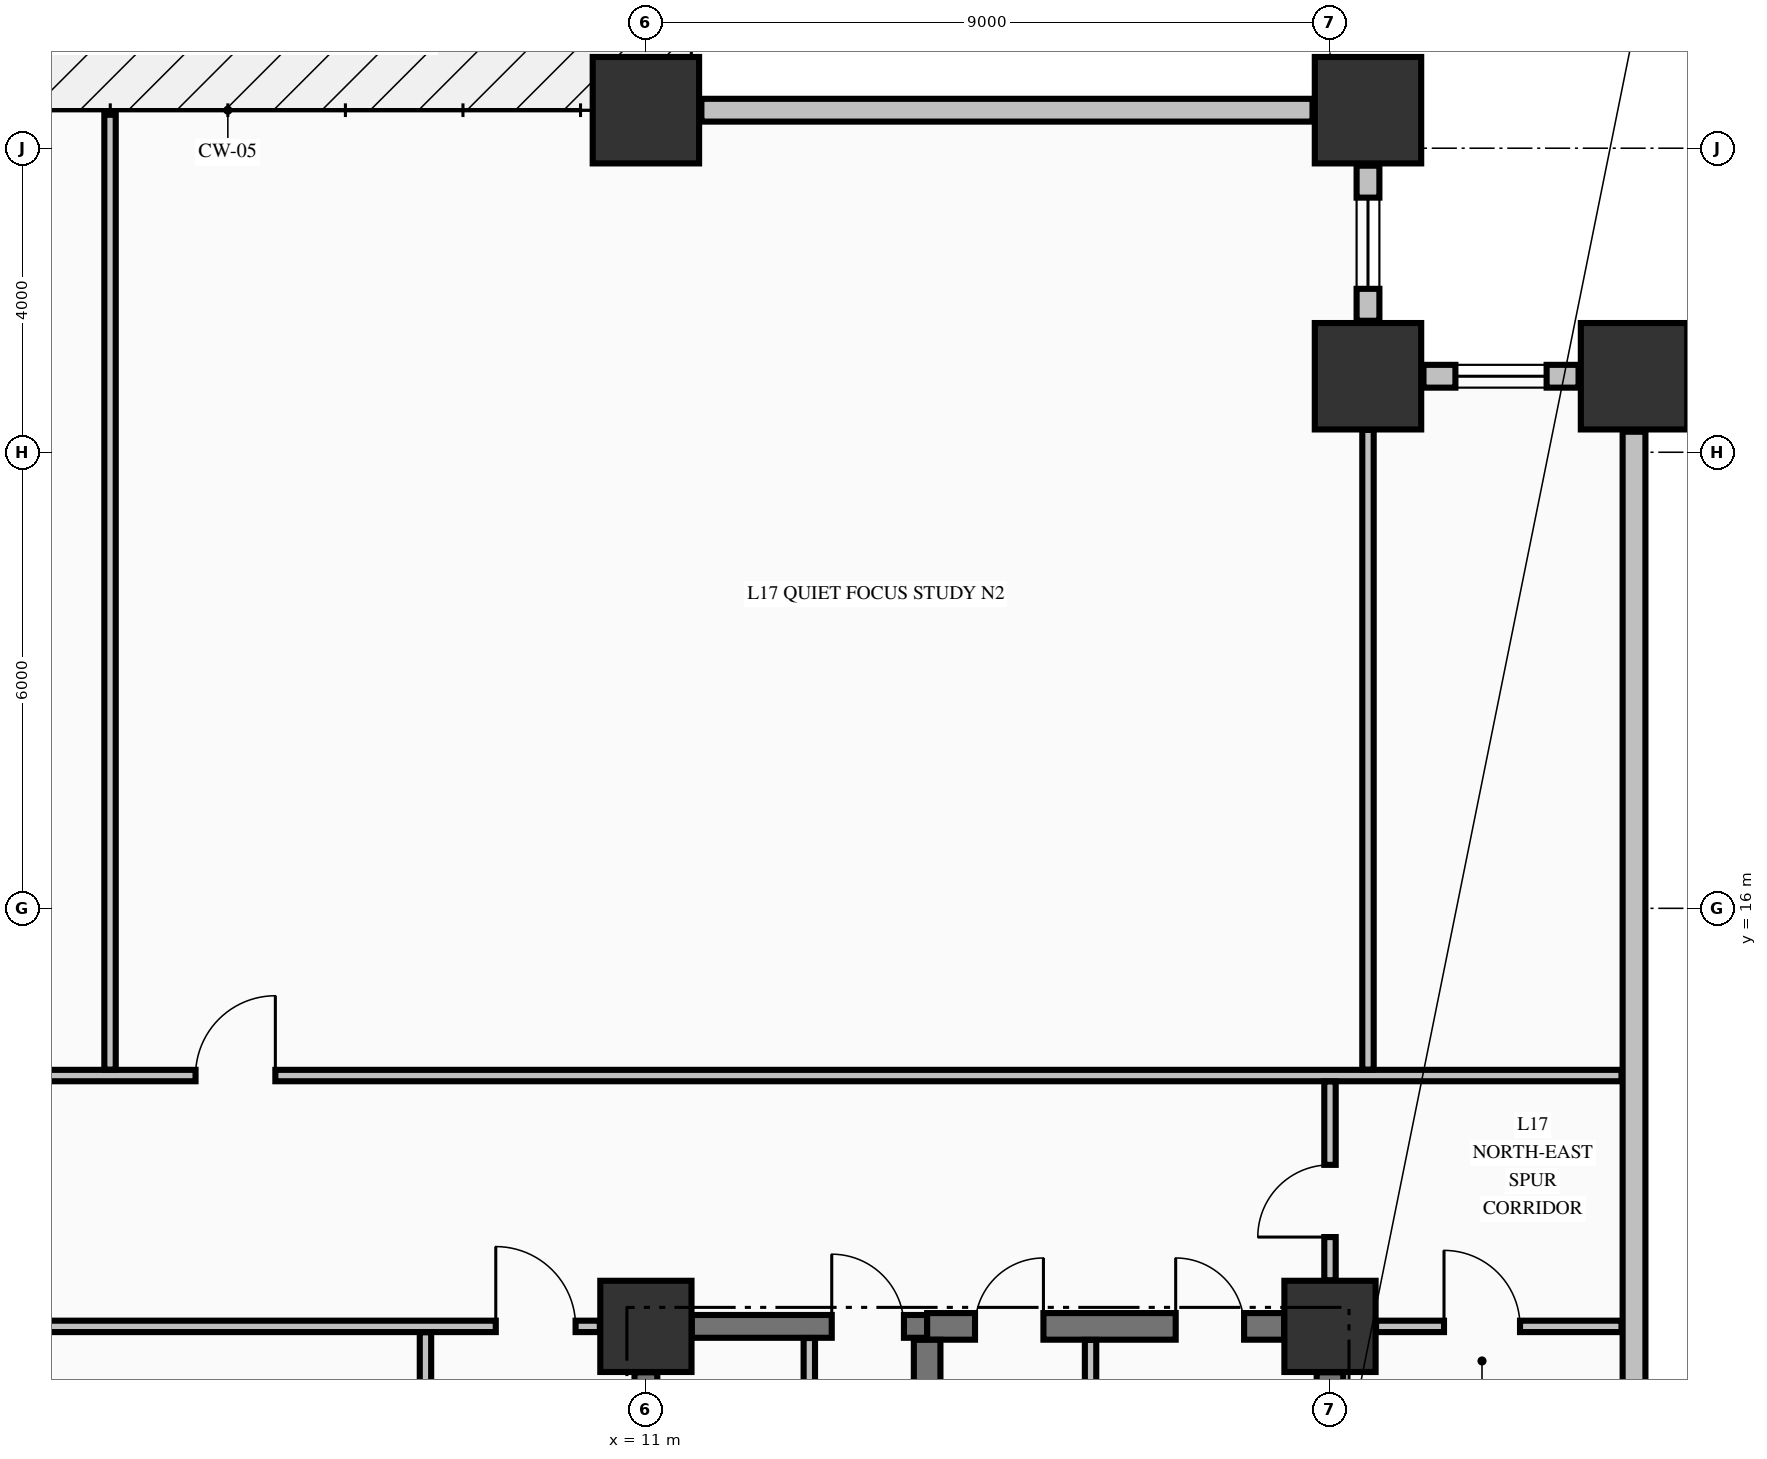
"""IFC4 building model, lengths in metres.
Left out: names, types, materials, properties, quantities, classifications, styles, units other than length and angle.
Written with IfcOpenShell. Run it as: python <this file> out.ifc"""

import sys

from ifc_helpers import new_model, si_unit, direction, frame, frame_2d, origin, origin_2d, place, context, subcontext, project, spatial, rectangle, extrude, element, fill, save


model = new_model("IFC4")
c1 = context("Model", 3, precision=1e-05, world=origin(), true_north=direction((0.0, 1.0)))
c2 = subcontext(c1, "Body", "Model", "MODEL_VIEW")
j1 = project(units=[si_unit("LENGTHUNIT", "METRE"), si_unit("PLANEANGLEUNIT", "RADIAN")], contexts=[c1])
p1 = place(None, origin())
s1 = spatial("IfcSite", under=j1, at=p1, CompositionType="ELEMENT")
p2 = place(p1, origin())
s2 = spatial("IfcBuilding", under=s1, at=p2, CompositionType="ELEMENT")
p3 = place(p2, frame((0.0, 0.0, 71.47)))
s3 = spatial("IfcBuildingStorey", under=s2, at=p3, CompositionType="ELEMENT", Elevation=71.47)
for number, where, z_axis, x_axis in (
    (1, (11.0, 26.5, -0.325), (0.0, 0.0, 1.0), (1.0, 0.0, 0.0)),
    (2, (20.5, 26.5, -0.325), (0.0, 0.0, 1.0), (1.0, 0.0, 0.0)),
    (3, (24.0, 23.0, -0.325), (0.0, 0.0, 1.0), (1.0, 0.0, 0.0)),
    (4, (20.5, 23.0, -0.325), (0.0, 0.0, 1.0), (1.0, 0.0, 0.0)),
):
    element("IfcColumn", number, at=place(p3, frame(where, z_axis=z_axis, x_axis=x_axis)), inside=s3, PredefinedType="COLUMN", context=c2, shape_type="SweptSolid", body=[
        extrude(rectangle(XDim=1.4, YDim=1.4, at=origin_2d()), origin(), (0.0, 0.0, 1.0), 3.645),
    ])
for number, where, z_axis, x_axis in (
    (5, (11.0, 10.5, -0.325), (0.0, 0.0, 1.0), (1.0, 0.0, 0.0)),
    (6, (20.0, 10.5, -0.325), (0.0, 0.0, 1.0), (1.0, 0.0, 0.0)),
):
    element("IfcColumn", number, at=place(p3, frame(where, z_axis=z_axis, x_axis=x_axis)), inside=s3, PredefinedType="COLUMN", context=c2, shape_type="SweptSolid", body=[
        extrude(rectangle(XDim=1.2, YDim=1.2, at=origin_2d()), origin(), (0.0, 0.0, 1.0), 3.645),
    ])
p4 = place(p3, frame((23.27, 23.0, 0.0), z_axis=(0.0, 0.0, 1.0), x_axis=(-1.0, 0.0, 0.0)))
e7 = element("IfcWall", 7, at=p4, inside=s3, PredefinedType="STANDARD", context=c2, shape_type="SweptSolid", body=[
    extrude(rectangle(XDim=2.04, YDim=0.3, at=frame_2d((1.02, 0.0))), origin(), (0.0, 0.0, 1.0), 2.712),
])
p5 = place(p4, frame((0.42, 0.0, 0.82)))
e8 = element("IfcOpeningElement", 8, at=p5, cuts=e7, PredefinedType="OPENING", context=c2, shape_type="SweptSolid", body=[
    extrude(rectangle(XDim=1.2, YDim=1.65, at=frame_2d((0.6, 0.825))), frame((0.0, 0.16, 0.0), z_axis=(0.0, -1.0, 0.0), x_axis=(1.0, 0.0, 0.0)), (0.0, 0.0, 1.0), 0.32),
])
p6 = place(p3, frame((20.5, 23.73, 0.0), z_axis=(0.0, 0.0, 1.0), x_axis=(0.0, 1.0, 0.0)))
e9 = element("IfcWall", 9, at=p6, inside=s3, PredefinedType="STANDARD", context=c2, shape_type="SweptSolid", body=[
    extrude(rectangle(XDim=2.04, YDim=0.3, at=frame_2d((1.02, 0.0))), origin(), (0.0, 0.0, 1.0), 2.712),
])
p7 = place(p6, frame((0.42, 0.0, 0.82)))
e10 = element("IfcOpeningElement", 10, at=p7, cuts=e9, PredefinedType="OPENING", context=c2, shape_type="SweptSolid", body=[
    extrude(rectangle(XDim=1.2, YDim=1.65, at=frame_2d((0.6, 0.825))), frame((0.0, 0.16, 0.0), z_axis=(0.0, -1.0, 0.0), x_axis=(1.0, 0.0, 0.0)), (0.0, 0.0, 1.0), 0.32),
])
p8 = place(p3, frame((19.77, 26.5, 0.0), z_axis=(0.0, 0.0, 1.0), x_axis=(-1.0, 0.0, 0.0)))
e11 = element("IfcWall", 11, at=p8, inside=s3, PredefinedType="STANDARD", context=c2, shape_type="SweptSolid", body=[
    extrude(rectangle(XDim=8.04, YDim=0.3, at=frame_2d((4.02, 0.0))), origin(), (0.0, 0.0, 1.0), 2.712),
])
p9 = place(p3, frame((24.0, 9.73, 0.0), z_axis=(0.0, 0.0, 1.0), x_axis=(0.0, 1.0, 0.0)))
e12 = element("IfcWall", 12, at=p9, inside=s3, PredefinedType="STANDARD", context=c2, shape_type="SweptSolid", body=[
    extrude(rectangle(XDim=12.54, YDim=0.3, at=frame_2d((6.27, 0.0))), origin(), (0.0, 0.0, 1.0), 2.712),
])
p10 = place(p3, frame((11.604, 10.5, 0.0), z_axis=(0.0, 0.0, 1.0), x_axis=(1.0, 0.0, 0.0)))
e13 = element("IfcWall", 13, at=p10, inside=s3, PredefinedType="SHEAR", context=c2, shape_type="SweptSolid", body=[
    extrude(rectangle(XDim=3.096, YDim=0.3, at=frame_2d((1.548, 0.0))), origin(), (0.0, 0.0, 1.0), 3.32),
])
p11 = place(p10, frame((1.841, 0.0, 0.0)))
e14 = element("IfcOpeningElement", 14, at=p11, cuts=e13, PredefinedType="OPENING", context=c2, shape_type="SweptSolid", body=[
    extrude(rectangle(XDim=0.95, YDim=2.15, at=frame_2d((0.475, 1.075))), frame((0.0, 0.16, 0.0), z_axis=(0.0, -1.0, 0.0), x_axis=(1.0, 0.0, 0.0)), (0.0, 0.0, 1.0), 0.32),
])
p12 = place(p3, frame((14.7, 10.5, 0.0), z_axis=(0.0, 0.0, 1.0), x_axis=(1.0, 0.0, 0.0)))
e15 = element("IfcWall", 15, at=p12, inside=s3, PredefinedType="SHEAR", context=c2, shape_type="SweptSolid", body=[
    extrude(rectangle(XDim=4.696, YDim=0.35, at=frame_2d((2.348, 0.0))), origin(), (0.0, 0.0, 1.0), 3.32),
])
p13 = place(p12, frame((0.63, 0.0, 0.0)))
e16 = element("IfcOpeningElement", 16, at=p13, cuts=e15, PredefinedType="OPENING", context=c2, shape_type="SweptSolid", body=[
    extrude(rectangle(XDim=0.9, YDim=2.15, at=frame_2d((0.45, 1.075))), frame((0.0, 0.185, 0.0), z_axis=(0.0, -1.0, 0.0), x_axis=(1.0, 0.0, 0.0)), (0.0, 0.0, 1.0), 0.37),
])
p14 = place(p12, frame((3.27, 0.0, 0.0)))
e17 = element("IfcOpeningElement", 17, at=p14, cuts=e15, PredefinedType="OPENING", context=c2, shape_type="SweptSolid", body=[
    extrude(rectangle(XDim=0.9, YDim=2.15, at=frame_2d((0.45, 1.075))), frame((0.0, 0.185, 0.0), z_axis=(0.0, -1.0, 0.0), x_axis=(1.0, 0.0, 0.0)), (0.0, 0.0, 1.0), 0.37),
])
p15 = place(p3, frame((-10.394, 10.5, 0.0), z_axis=(0.0, 0.0, 1.0), x_axis=(1.0, 0.0, 0.0)))
e18 = element("IfcWall", 18, at=p15, inside=s3, PredefinedType="PARTITIONING", context=c2, shape_type="SweptSolid", body=[
    extrude(rectangle(XDim=20.788, YDim=0.15, at=frame_2d((10.394, 0.0))), origin(), (0.0, 0.0, 1.0), 3.32),
])
p16 = place(p15, frame((0.319, 0.0, 0.0)))
e19 = element("IfcOpeningElement", 19, at=p16, cuts=e18, PredefinedType="OPENING", context=c2, shape_type="SweptSolid", body=[
    extrude(rectangle(XDim=1.05, YDim=2.15, at=frame_2d((0.525, 1.075))), frame((0.0, 0.085, 0.0), z_axis=(0.0, -1.0, 0.0), x_axis=(1.0, 0.0, 0.0)), (0.0, 0.0, 1.0), 0.17),
])
p17 = place(p15, frame((19.419, 0.0, 0.0)))
e20 = element("IfcOpeningElement", 20, at=p17, cuts=e18, PredefinedType="OPENING", context=c2, shape_type="SweptSolid", body=[
    extrude(rectangle(XDim=1.05, YDim=2.15, at=frame_2d((0.525, 1.075))), frame((0.0, 0.085, 0.0), z_axis=(0.0, -1.0, 0.0), x_axis=(1.0, 0.0, 0.0)), (0.0, 0.0, 1.0), 0.17),
])
p18 = place(p3, frame((20.606, 10.5, 0.0), z_axis=(0.0, 0.0, 1.0), x_axis=(1.0, 0.0, 0.0)))
e21 = element("IfcWall", 21, at=p18, inside=s3, PredefinedType="PARTITIONING", context=c2, shape_type="SweptSolid", body=[
    extrude(rectangle(XDim=3.229, YDim=0.15, at=frame_2d((1.615, 0.0))), origin(), (0.0, 0.0, 1.0), 3.32),
])
p19 = place(p18, frame((0.894, 0.0, 0.0)))
e22 = element("IfcOpeningElement", 22, at=p19, cuts=e21, PredefinedType="OPENING", context=c2, shape_type="SweptSolid", body=[
    extrude(rectangle(XDim=1.0, YDim=2.15, at=frame_2d((0.5, 1.075))), frame((0.0, 0.085, 0.0), z_axis=(0.0, -1.0, 0.0), x_axis=(1.0, 0.0, 0.0)), (0.0, 0.0, 1.0), 0.17),
])
p20 = place(p3, frame((-28.835, 13.8, 0.0), z_axis=(0.0, 0.0, 1.0), x_axis=(1.0, 0.0, 0.0)))
e23 = element("IfcWall", 23, at=p20, inside=s3, PredefinedType="PARTITIONING", context=c2, shape_type="SweptSolid", body=[
    extrude(rectangle(XDim=52.67, YDim=0.15, at=frame_2d((26.335, 0.0))), origin(), (0.0, 0.0, 1.0), 3.32),
])
p21 = place(p20, frame((20.38, 0.0, 0.0)))
e24 = element("IfcOpeningElement", 24, at=p21, cuts=e23, PredefinedType="OPENING", context=c2, shape_type="SweptSolid", body=[
    extrude(rectangle(XDim=1.05, YDim=2.15, at=frame_2d((0.525, 1.075))), frame((0.0, 0.085, 0.0), z_axis=(0.0, -1.0, 0.0), x_axis=(1.0, 0.0, 0.0)), (0.0, 0.0, 1.0), 0.17),
])
p22 = place(p20, frame((33.91, 0.0, 0.0)))
e25 = element("IfcOpeningElement", 25, at=p22, cuts=e23, PredefinedType="OPENING", context=c2, shape_type="SweptSolid", body=[
    extrude(rectangle(XDim=1.05, YDim=2.15, at=frame_2d((0.525, 1.075))), frame((0.0, 0.085, 0.0), z_axis=(0.0, -1.0, 0.0), x_axis=(1.0, 0.0, 0.0)), (0.0, 0.0, 1.0), 0.17),
])
p23 = place(p3, frame((11.0, 5.852, 0.0), z_axis=(0.0, 0.0, 1.0), x_axis=(0.0, 1.0, 0.0)))
e26 = element("IfcWall", 26, at=p23, inside=s3, PredefinedType="SHEAR", context=c2, shape_type="SweptSolid", body=[
    extrude(rectangle(XDim=4.044, YDim=0.3, at=frame_2d((2.022, 0.0))), origin(), (0.0, 0.0, 1.0), 3.32),
])
p24 = place(p3, frame((14.7, 5.852, 0.0), z_axis=(0.0, 0.0, 1.0), x_axis=(0.0, 1.0, 0.0)))
e27 = element("IfcWall", 27, at=p24, inside=s3, PredefinedType="SHEAR", context=c2, shape_type="SweptSolid", body=[
    extrude(rectangle(XDim=4.471, YDim=0.35, at=frame_2d((2.235, 0.0))), origin(), (0.0, 0.0, 1.0), 3.32),
])
p25 = place(p3, frame((20.0, 0.604, 0.0), z_axis=(0.0, 0.0, 1.0), x_axis=(0.0, 1.0, 0.0)))
e28 = element("IfcWall", 28, at=p25, inside=s3, PredefinedType="SHEAR", context=c2, shape_type="SweptSolid", body=[
    extrude(rectangle(XDim=9.292, YDim=0.35, at=frame_2d((4.646, 0.0))), origin(), (0.0, 0.0, 1.0), 3.32),
])
p26 = place(p3, frame((3.95, 13.878, 0.0), z_axis=(0.0, 0.0, 1.0), x_axis=(0.0, 1.0, 0.0)))
e29 = element("IfcWall", 29, at=p26, inside=s3, PredefinedType="PARTITIONING", context=c2, shape_type="SweptSolid", body=[
    extrude(rectangle(XDim=12.562, YDim=0.15, at=frame_2d((6.281, 0.0))), origin(), (0.0, 0.0, 1.0), 3.32),
])
p27 = place(p3, frame((8.1, -1.097, 0.0), z_axis=(0.0, 0.0, 1.0), x_axis=(0.0, 1.0, 0.0)))
e30 = element("IfcWall", 30, at=p27, inside=s3, PredefinedType="PARTITIONING", context=c2, shape_type="SweptSolid", body=[
    extrude(rectangle(XDim=11.519, YDim=0.15, at=frame_2d((5.76, 0.0))), origin(), (0.0, 0.0, 1.0), 3.32),
])
p28 = place(p27, frame((5.197, 0.0, 0.0)))
e31 = element("IfcOpeningElement", 31, at=p28, cuts=e30, PredefinedType="OPENING", context=c2, shape_type="SweptSolid", body=[
    extrude(rectangle(XDim=1.1, YDim=2.15, at=frame_2d((0.55, 1.075))), frame((0.0, 0.085, 0.0), z_axis=(0.0, -1.0, 0.0), x_axis=(1.0, 0.0, 0.0)), (0.0, 0.0, 1.0), 0.17),
])
p29 = place(p3, frame((13.15, 7.228, 0.0), z_axis=(0.0, 0.0, 1.0), x_axis=(0.0, 1.0, 0.0)))
e32 = element("IfcWall", 32, at=p29, inside=s3, PredefinedType="PARTITIONING", context=c2, shape_type="SweptSolid", body=[
    extrude(rectangle(XDim=3.119, YDim=0.15, at=frame_2d((1.56, 0.0))), origin(), (0.0, 0.0, 1.0), 3.32),
])
p30 = place(p29, frame((1.097, 0.0, 0.0)))
e33 = element("IfcOpeningElement", 33, at=p30, cuts=e32, PredefinedType="OPENING", context=c2, shape_type="SweptSolid", body=[
    extrude(rectangle(XDim=0.95, YDim=2.15, at=frame_2d((0.475, 1.075))), frame((0.0, 0.085, 0.0), z_axis=(0.0, -1.0, 0.0), x_axis=(1.0, 0.0, 0.0)), (0.0, 0.0, 1.0), 0.17),
])
p31 = place(p3, frame((16.85, 3.078, 0.0), z_axis=(0.0, 0.0, 1.0), x_axis=(0.0, 1.0, 0.0)))
e34 = element("IfcWall", 34, at=p31, inside=s3, PredefinedType="PARTITIONING", context=c2, shape_type="SweptSolid", body=[
    extrude(rectangle(XDim=7.244, YDim=0.15, at=frame_2d((3.622, 0.0))), origin(), (0.0, 0.0, 1.0), 3.32),
])
p32 = place(p3, frame((20.0, 11.106, 0.0), z_axis=(0.0, 0.0, 1.0), x_axis=(0.0, 1.0, 0.0)))
e35 = element("IfcWall", 35, at=p32, inside=s3, PredefinedType="PARTITIONING", context=c2, shape_type="SweptSolid", body=[
    extrude(rectangle(XDim=2.616, YDim=0.15, at=frame_2d((1.308, 0.0))), origin(), (0.0, 0.0, 1.0), 3.32),
])
p33 = place(p32, frame((0.569, 0.0, 0.0)))
e36 = element("IfcOpeningElement", 36, at=p33, cuts=e35, PredefinedType="OPENING", context=c2, shape_type="SweptSolid", body=[
    extrude(rectangle(XDim=0.95, YDim=2.15, at=frame_2d((0.475, 1.075))), frame((0.0, 0.085, 0.0), z_axis=(0.0, -1.0, 0.0), x_axis=(1.0, 0.0, 0.0)), (0.0, 0.0, 1.0), 0.17),
])
p34 = place(p3, frame((20.5, 13.878, 0.0), z_axis=(0.0, 0.0, 1.0), x_axis=(0.0, 1.0, 0.0)))
e37 = element("IfcWall", 37, at=p34, inside=s3, PredefinedType="PARTITIONING", context=c2, shape_type="SweptSolid", body=[
    extrude(rectangle(XDim=8.416, YDim=0.15, at=frame_2d((4.208, 0.0))), origin(), (0.0, 0.0, 1.0), 3.32),
])
p35 = place(p5, origin())
e38 = element("IfcWindow", 38, at=p35, inside=s3, PartitioningType="SINGLE_PANEL", PredefinedType="WINDOW", context=c2, shape_type="SweptSolid", body=[
    extrude(rectangle(XDim=1.2, YDim=1.65, at=frame_2d((0.6, 0.825))), frame((0.0, 0.03, 0.0), z_axis=(0.0, -1.0, 0.0), x_axis=(1.0, 0.0, 0.0)), (0.0, 0.0, 1.0), 0.06),
])
fill(e8, e38)
p36 = place(p7, origin())
e39 = element("IfcWindow", 39, at=p36, inside=s3, PartitioningType="SINGLE_PANEL", PredefinedType="WINDOW", context=c2, shape_type="SweptSolid", body=[
    extrude(rectangle(XDim=1.2, YDim=1.65, at=frame_2d((0.6, 0.825))), frame((0.0, 0.03, 0.0), z_axis=(0.0, -1.0, 0.0), x_axis=(1.0, 0.0, 0.0)), (0.0, 0.0, 1.0), 0.06),
])
fill(e10, e39)
p37 = place(p11, origin())
e40 = element("IfcDoor", 40, at=p37, inside=s3, OperationType="SINGLE_SWING_LEFT", PredefinedType="DOOR", context=c2, shape_type="SweptSolid", body=[
    extrude(rectangle(XDim=0.95, YDim=2.15, at=frame_2d((0.475, 1.075))), frame((0.0, 0.025, 0.0), z_axis=(0.0, -1.0, 0.0), x_axis=(1.0, 0.0, 0.0)), (0.0, 0.0, 1.0), 0.05),
])
fill(e14, e40)
p38 = place(p13, origin())
e41 = element("IfcDoor", 41, at=p38, inside=s3, OperationType="SINGLE_SWING_RIGHT", PredefinedType="DOOR", context=c2, shape_type="SweptSolid", body=[
    extrude(rectangle(XDim=0.9, YDim=2.15, at=frame_2d((0.45, 1.075))), frame((0.0, 0.025, 0.0), z_axis=(0.0, -1.0, 0.0), x_axis=(1.0, 0.0, 0.0)), (0.0, 0.0, 1.0), 0.05),
])
fill(e16, e41)
p39 = place(p14, origin())
e42 = element("IfcDoor", 42, at=p39, inside=s3, OperationType="SINGLE_SWING_LEFT", PredefinedType="DOOR", context=c2, shape_type="SweptSolid", body=[
    extrude(rectangle(XDim=0.9, YDim=2.15, at=frame_2d((0.45, 1.075))), frame((0.0, 0.025, 0.0), z_axis=(0.0, -1.0, 0.0), x_axis=(1.0, 0.0, 0.0)), (0.0, 0.0, 1.0), 0.05),
])
fill(e17, e42)
p40 = place(p17, origin())
e43 = element("IfcDoor", 43, at=p40, inside=s3, OperationType="SINGLE_SWING_LEFT", PredefinedType="DOOR", context=c2, shape_type="SweptSolid", body=[
    extrude(rectangle(XDim=1.05, YDim=2.15, at=frame_2d((0.525, 1.075))), frame((0.0, 0.025, 0.0), z_axis=(0.0, -1.0, 0.0), x_axis=(1.0, 0.0, 0.0)), (0.0, 0.0, 1.0), 0.05),
])
fill(e20, e43)
p41 = place(p22, origin())
e44 = element("IfcDoor", 44, at=p41, inside=s3, OperationType="SINGLE_SWING_RIGHT", PredefinedType="DOOR", context=c2, shape_type="SweptSolid", body=[
    extrude(rectangle(XDim=1.05, YDim=2.15, at=frame_2d((0.525, 1.075))), frame((0.0, 0.025, 0.0), z_axis=(0.0, -1.0, 0.0), x_axis=(1.0, 0.0, 0.0)), (0.0, 0.0, 1.0), 0.05),
])
fill(e25, e44)
p42 = place(p33, origin())
e45 = element("IfcDoor", 45, at=p42, inside=s3, OperationType="SINGLE_SWING_LEFT", PredefinedType="DOOR", context=c2, shape_type="SweptSolid", body=[
    extrude(rectangle(XDim=0.95, YDim=2.15, at=frame_2d((0.475, 1.075))), frame((0.0, 0.025, 0.0), z_axis=(0.0, -1.0, 0.0), x_axis=(1.0, 0.0, 0.0)), (0.0, 0.0, 1.0), 0.05),
])
fill(e36, e45)
p43 = place(p19, origin())
e46 = element("IfcDoor", 46, at=p43, inside=s3, OperationType="SINGLE_SWING_LEFT", PredefinedType="DOOR", context=c2, shape_type="SweptSolid", body=[
    extrude(rectangle(XDim=1.0, YDim=2.15, at=frame_2d((0.5, 1.075))), frame((0.0, 0.025, 0.0), z_axis=(0.0, -1.0, 0.0), x_axis=(1.0, 0.0, 0.0)), (0.0, 0.0, 1.0), 0.05),
])
fill(e22, e46)
save(model, sys.argv[1])
